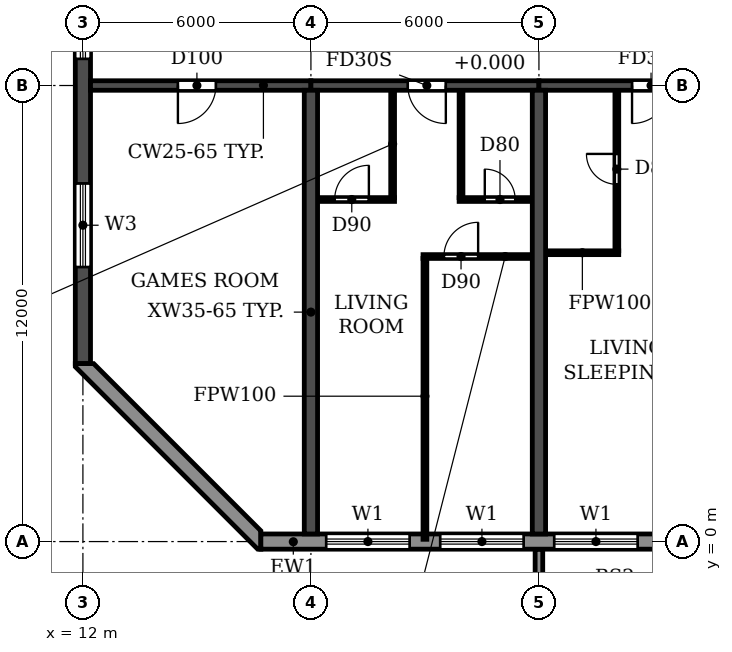
"""IFC4 building model, lengths in metres.
Left out: names, types, materials, properties, quantities, classifications, styles, units other than length and angle.
Written with IfcOpenShell. Run it as: python <this file> out.ifc"""

import sys

from ifc_helpers import new_model, si_unit, direction, frame, frame_2d, origin, place, context, subcontext, project, spatial, polyline, rectangle, outline, extrude, source, transform, mapped, element, fill, save


model = new_model("IFC4")
c1 = context("Model", 3, precision=1e-05, world=origin(), true_north=direction((0.0, 1.0)))
c2 = subcontext(c1, "Body", "Model", "MODEL_VIEW")
j1 = project(units=[si_unit("LENGTHUNIT", "METRE"), si_unit("PLANEANGLEUNIT", "RADIAN")], contexts=[c1])
p1 = place(None, origin())
s1 = spatial("IfcSite", under=j1, at=p1, CompositionType="ELEMENT")
p2 = place(p1, origin())
s2 = spatial("IfcBuilding", under=s1, at=p2, CompositionType="ELEMENT")
p3 = place(p2, frame((0.0, 0.0, 112.5)))
s3 = spatial("IfcBuildingStorey", under=s2, at=p3, CompositionType="ELEMENT", Elevation=112.5)
for number, where, z_axis, x_axis in (
    (1, (18.0, 0.2, 0.0), (0.0, 0.0, 1.0), (0.0, 1.0, 0.0)),
    (2, (24.0, 0.2, 0.0), (0.0, 0.0, 1.0), (0.0, 1.0, 0.0)),
):
    element("IfcWall", number, at=place(p3, frame(where, z_axis=z_axis, x_axis=x_axis)), inside=s3, PredefinedType="SHEAR", context=c2, shape_type="SweptSolid", body=[
        extrude(rectangle(XDim=11.675, YDim=0.35, at=frame_2d((5.837, 0.0))), origin(), (0.0, 0.0, 1.0), 2.95),
    ])
p4 = place(p3, frame((12.0, 4.683, 0.0), z_axis=(0.0, 0.0, 1.0), x_axis=(0.0, 1.0, 0.0)))
e3 = element("IfcWall", 3, at=p4, inside=s3, PredefinedType="SHEAR", context=c2, shape_type="SweptSolid", body=[
    extrude(rectangle(XDim=34.234, YDim=0.4, at=frame_2d((17.117, 0.0))), origin(), (0.0, 0.0, 1.0), 2.95),
])
p5 = place(p4, frame((23.817, 0.0, 0.9)))
e4 = element("IfcOpeningElement", 4, at=p5, cuts=e3, PredefinedType="OPENING", context=c2, shape_type="SweptSolid", body=[
    extrude(rectangle(XDim=1.2, YDim=1.5, at=frame_2d((0.6, 0.75))), frame((0.0, 0.21, 0.0), z_axis=(0.0, -1.0, 0.0), x_axis=(1.0, 0.0, 0.0)), (0.0, 0.0, 1.0), 0.42),
])
p6 = place(p4, frame((8.017, 0.0, 0.9)))
e5 = element("IfcOpeningElement", 5, at=p6, cuts=e3, PredefinedType="OPENING", context=c2, shape_type="SweptSolid", body=[
    extrude(rectangle(XDim=1.2, YDim=1.5, at=frame_2d((0.6, 0.75))), frame((0.0, 0.21, 0.0), z_axis=(0.0, -1.0, 0.0), x_axis=(1.0, 0.0, 0.0)), (0.0, 0.0, 1.0), 0.42),
])
p7 = place(p4, frame((15.917, 0.0, 0.9)))
e6 = element("IfcOpeningElement", 6, at=p7, cuts=e3, PredefinedType="OPENING", context=c2, shape_type="SweptSolid", body=[
    extrude(rectangle(XDim=1.2, YDim=1.5, at=frame_2d((0.6, 0.75))), frame((0.0, 0.21, 0.0), z_axis=(0.0, -1.0, 0.0), x_axis=(1.0, 0.0, 0.0)), (0.0, 0.0, 1.0), 0.42),
])
p8 = place(p4, frame((28.894, 0.0, 0.6)))
e7 = element("IfcOpeningElement", 7, at=p8, cuts=e3, PredefinedType="OPENING", context=c2, shape_type="SweptSolid", body=[
    extrude(rectangle(XDim=2.2, YDim=1.8, at=frame_2d((1.1, 0.9))), frame((0.0, 0.21, 0.0), z_axis=(0.0, -1.0, 0.0), x_axis=(1.0, 0.0, 0.0)), (0.0, 0.0, 1.0), 0.42),
])
p9 = place(p4, frame((2.541, 0.0, 0.6)))
e8 = element("IfcOpeningElement", 8, at=p9, cuts=e3, PredefinedType="OPENING", context=c2, shape_type="SweptSolid", body=[
    extrude(rectangle(XDim=2.2, YDim=1.8, at=frame_2d((1.1, 0.9))), frame((0.0, 0.21, 0.0), z_axis=(0.0, -1.0, 0.0), x_axis=(1.0, 0.0, 0.0)), (0.0, 0.0, 1.0), 0.42),
])
p10 = place(p3, frame((12.2, 12.0, 0.0), z_axis=(0.0, 0.0, 1.0), x_axis=(1.0, 0.0, 0.0)))
e9 = element("IfcWall", 9, at=p10, inside=s3, PredefinedType="SHEAR", context=c2, shape_type="SweptSolid", body=[
    extrude(rectangle(XDim=5.8, YDim=0.25, at=frame_2d((2.9, 0.0))), origin(), (0.0, 0.0, 1.0), 2.35),
])
p11 = place(p10, frame((2.3, 0.0, 0.0)))
e10 = element("IfcOpeningElement", 10, at=p11, cuts=e9, PredefinedType="OPENING", context=c2, shape_type="SweptSolid", body=[
    extrude(rectangle(XDim=1.0, YDim=2.1, at=frame_2d((0.5, 1.05))), frame((0.0, 0.135, 0.0), z_axis=(0.0, -1.0, 0.0), x_axis=(1.0, 0.0, 0.0)), (0.0, 0.0, 1.0), 0.27),
])
p12 = place(p3, frame((18.0, 12.0, 0.0), z_axis=(0.0, 0.0, 1.0), x_axis=(1.0, 0.0, 0.0)))
e11 = element("IfcWall", 11, at=p12, inside=s3, PredefinedType="SHEAR", context=c2, shape_type="SweptSolid", body=[
    extrude(rectangle(XDim=6.0, YDim=0.25, at=frame_2d((3.0, 0.0))), origin(), (0.0, 0.0, 1.0), 2.35),
])
p13 = place(p12, frame((2.55, 0.0, 0.0)))
e12 = element("IfcOpeningElement", 12, at=p13, cuts=e11, PredefinedType="OPENING", context=c2, shape_type="SweptSolid", body=[
    extrude(rectangle(XDim=1.0, YDim=2.1, at=frame_2d((0.5, 1.05))), frame((0.0, 0.135, 0.0), z_axis=(0.0, -1.0, 0.0), x_axis=(1.0, 0.0, 0.0)), (0.0, 0.0, 1.0), 0.27),
])
p14 = place(p3, frame((24.0, 12.0, 0.0), z_axis=(0.0, 0.0, 1.0), x_axis=(1.0, 0.0, 0.0)))
e13 = element("IfcWall", 13, at=p14, inside=s3, PredefinedType="SHEAR", context=c2, shape_type="SweptSolid", body=[
    extrude(rectangle(XDim=6.0, YDim=0.25, at=frame_2d((3.0, 0.0))), origin(), (0.0, 0.0, 1.0), 2.35),
])
p15 = place(p14, frame((2.45, 0.0, 0.0)))
e14 = element("IfcOpeningElement", 14, at=p15, cuts=e13, PredefinedType="OPENING", context=c2, shape_type="SweptSolid", body=[
    extrude(rectangle(XDim=1.0, YDim=2.1, at=frame_2d((0.5, 1.05))), frame((0.0, 0.135, 0.0), z_axis=(0.0, -1.0, 0.0), x_axis=(1.0, 0.0, 0.0)), (0.0, 0.0, 1.0), 0.27),
])
p16 = place(p3, frame((16.683, 0.0, 0.0), z_axis=(0.0, 0.0, 1.0), x_axis=(1.0, 0.0, 0.0)))
e15 = element("IfcWall", 15, at=p16, inside=s3, PredefinedType="STANDARD", context=c2, shape_type="SweptSolid", body=[
    extrude(rectangle(XDim=68.634, YDim=0.4, at=frame_2d((34.317, 0.0))), origin(), (0.0, 0.0, 1.0), 2.95),
])
p17 = place(p16, frame((1.717, 0.0, 0.9)))
e16 = element("IfcOpeningElement", 16, at=p17, cuts=e15, PredefinedType="OPENING", context=c2, shape_type="SweptSolid", body=[
    extrude(rectangle(XDim=2.2, YDim=1.5, at=frame_2d((1.1, 0.75))), frame((0.0, 0.21, 0.0), z_axis=(0.0, -1.0, 0.0), x_axis=(1.0, 0.0, 0.0)), (0.0, 0.0, 1.0), 0.42),
])
p18 = place(p16, frame((4.717, 0.0, 0.9)))
e17 = element("IfcOpeningElement", 17, at=p18, cuts=e15, PredefinedType="OPENING", context=c2, shape_type="SweptSolid", body=[
    extrude(rectangle(XDim=2.2, YDim=1.5, at=frame_2d((1.1, 0.75))), frame((0.0, 0.21, 0.0), z_axis=(0.0, -1.0, 0.0), x_axis=(1.0, 0.0, 0.0)), (0.0, 0.0, 1.0), 0.42),
])
p19 = place(p16, frame((7.717, 0.0, 0.9)))
e18 = element("IfcOpeningElement", 18, at=p19, cuts=e15, PredefinedType="OPENING", context=c2, shape_type="SweptSolid", body=[
    extrude(rectangle(XDim=2.2, YDim=1.5, at=frame_2d((1.1, 0.75))), frame((0.0, 0.21, 0.0), z_axis=(0.0, -1.0, 0.0), x_axis=(1.0, 0.0, 0.0)), (0.0, 0.0, 1.0), 0.42),
])
p20 = place(p16, frame((10.917, 0.0, 0.0)))
e19 = element("IfcOpeningElement", 19, at=p20, cuts=e15, PredefinedType="OPENING", context=c2, shape_type="SweptSolid", body=[
    extrude(rectangle(XDim=1.8, YDim=2.4, at=frame_2d((0.9, 1.2))), frame((0.0, 0.21, 0.0), z_axis=(0.0, -1.0, 0.0), x_axis=(1.0, 0.0, 0.0)), (0.0, 0.0, 1.0), 0.42),
])
p21 = place(p16, frame((13.717, 0.0, 0.9)))
e20 = element("IfcOpeningElement", 20, at=p21, cuts=e15, PredefinedType="OPENING", context=c2, shape_type="SweptSolid", body=[
    extrude(rectangle(XDim=2.2, YDim=1.5, at=frame_2d((1.1, 0.75))), frame((0.0, 0.21, 0.0), z_axis=(0.0, -1.0, 0.0), x_axis=(1.0, 0.0, 0.0)), (0.0, 0.0, 1.0), 0.42),
])
p22 = place(p16, frame((16.717, 0.0, 0.9)))
e21 = element("IfcOpeningElement", 21, at=p22, cuts=e15, PredefinedType="OPENING", context=c2, shape_type="SweptSolid", body=[
    extrude(rectangle(XDim=2.2, YDim=1.5, at=frame_2d((1.1, 0.75))), frame((0.0, 0.21, 0.0), z_axis=(0.0, -1.0, 0.0), x_axis=(1.0, 0.0, 0.0)), (0.0, 0.0, 1.0), 0.42),
])
p23 = place(p16, frame((19.717, 0.0, 0.9)))
e22 = element("IfcOpeningElement", 22, at=p23, cuts=e15, PredefinedType="OPENING", context=c2, shape_type="SweptSolid", body=[
    extrude(rectangle(XDim=2.2, YDim=1.5, at=frame_2d((1.1, 0.75))), frame((0.0, 0.21, 0.0), z_axis=(0.0, -1.0, 0.0), x_axis=(1.0, 0.0, 0.0)), (0.0, 0.0, 1.0), 0.42),
])
p24 = place(p16, frame((22.717, 0.0, 0.9)))
e23 = element("IfcOpeningElement", 23, at=p24, cuts=e15, PredefinedType="OPENING", context=c2, shape_type="SweptSolid", body=[
    extrude(rectangle(XDim=2.2, YDim=1.5, at=frame_2d((1.1, 0.75))), frame((0.0, 0.21, 0.0), z_axis=(0.0, -1.0, 0.0), x_axis=(1.0, 0.0, 0.0)), (0.0, 0.0, 1.0), 0.42),
])
p25 = place(p16, frame((25.717, 0.0, 0.9)))
e24 = element("IfcOpeningElement", 24, at=p25, cuts=e15, PredefinedType="OPENING", context=c2, shape_type="SweptSolid", body=[
    extrude(rectangle(XDim=2.2, YDim=1.5, at=frame_2d((1.1, 0.75))), frame((0.0, 0.21, 0.0), z_axis=(0.0, -1.0, 0.0), x_axis=(1.0, 0.0, 0.0)), (0.0, 0.0, 1.0), 0.42),
])
p26 = place(p16, frame((28.717, 0.0, 0.9)))
e25 = element("IfcOpeningElement", 25, at=p26, cuts=e15, PredefinedType="OPENING", context=c2, shape_type="SweptSolid", body=[
    extrude(rectangle(XDim=2.2, YDim=1.5, at=frame_2d((1.1, 0.75))), frame((0.0, 0.21, 0.0), z_axis=(0.0, -1.0, 0.0), x_axis=(1.0, 0.0, 0.0)), (0.0, 0.0, 1.0), 0.42),
])
p27 = place(p16, frame((31.917, 0.0, 0.0)))
e26 = element("IfcOpeningElement", 26, at=p27, cuts=e15, PredefinedType="OPENING", context=c2, shape_type="SweptSolid", body=[
    extrude(rectangle(XDim=1.8, YDim=2.4, at=frame_2d((0.9, 1.2))), frame((0.0, 0.21, 0.0), z_axis=(0.0, -1.0, 0.0), x_axis=(1.0, 0.0, 0.0)), (0.0, 0.0, 1.0), 0.42),
])
p28 = place(p16, frame((34.717, 0.0, 0.9)))
e27 = element("IfcOpeningElement", 27, at=p28, cuts=e15, PredefinedType="OPENING", context=c2, shape_type="SweptSolid", body=[
    extrude(rectangle(XDim=2.2, YDim=1.5, at=frame_2d((1.1, 0.75))), frame((0.0, 0.21, 0.0), z_axis=(0.0, -1.0, 0.0), x_axis=(1.0, 0.0, 0.0)), (0.0, 0.0, 1.0), 0.42),
])
p29 = place(p16, frame((37.717, 0.0, 0.9)))
e28 = element("IfcOpeningElement", 28, at=p29, cuts=e15, PredefinedType="OPENING", context=c2, shape_type="SweptSolid", body=[
    extrude(rectangle(XDim=2.2, YDim=1.5, at=frame_2d((1.1, 0.75))), frame((0.0, 0.21, 0.0), z_axis=(0.0, -1.0, 0.0), x_axis=(1.0, 0.0, 0.0)), (0.0, 0.0, 1.0), 0.42),
])
p30 = place(p16, frame((40.717, 0.0, 0.9)))
e29 = element("IfcOpeningElement", 29, at=p30, cuts=e15, PredefinedType="OPENING", context=c2, shape_type="SweptSolid", body=[
    extrude(rectangle(XDim=2.2, YDim=1.5, at=frame_2d((1.1, 0.75))), frame((0.0, 0.21, 0.0), z_axis=(0.0, -1.0, 0.0), x_axis=(1.0, 0.0, 0.0)), (0.0, 0.0, 1.0), 0.42),
])
p31 = place(p16, frame((43.717, 0.0, 0.9)))
e30 = element("IfcOpeningElement", 30, at=p31, cuts=e15, PredefinedType="OPENING", context=c2, shape_type="SweptSolid", body=[
    extrude(rectangle(XDim=2.2, YDim=1.5, at=frame_2d((1.1, 0.75))), frame((0.0, 0.21, 0.0), z_axis=(0.0, -1.0, 0.0), x_axis=(1.0, 0.0, 0.0)), (0.0, 0.0, 1.0), 0.42),
])
p32 = place(p16, frame((46.917, 0.0, 0.0)))
e31 = element("IfcOpeningElement", 31, at=p32, cuts=e15, PredefinedType="OPENING", context=c2, shape_type="SweptSolid", body=[
    extrude(rectangle(XDim=1.8, YDim=2.4, at=frame_2d((0.9, 1.2))), frame((0.0, 0.21, 0.0), z_axis=(0.0, -1.0, 0.0), x_axis=(1.0, 0.0, 0.0)), (0.0, 0.0, 1.0), 0.42),
])
p33 = place(p16, frame((49.717, 0.0, 0.9)))
e32 = element("IfcOpeningElement", 32, at=p33, cuts=e15, PredefinedType="OPENING", context=c2, shape_type="SweptSolid", body=[
    extrude(rectangle(XDim=2.2, YDim=1.5, at=frame_2d((1.1, 0.75))), frame((0.0, 0.21, 0.0), z_axis=(0.0, -1.0, 0.0), x_axis=(1.0, 0.0, 0.0)), (0.0, 0.0, 1.0), 0.42),
])
p34 = place(p16, frame((52.717, 0.0, 0.9)))
e33 = element("IfcOpeningElement", 33, at=p34, cuts=e15, PredefinedType="OPENING", context=c2, shape_type="SweptSolid", body=[
    extrude(rectangle(XDim=2.2, YDim=1.5, at=frame_2d((1.1, 0.75))), frame((0.0, 0.21, 0.0), z_axis=(0.0, -1.0, 0.0), x_axis=(1.0, 0.0, 0.0)), (0.0, 0.0, 1.0), 0.42),
])
p35 = place(p16, frame((55.717, 0.0, 0.9)))
e34 = element("IfcOpeningElement", 34, at=p35, cuts=e15, PredefinedType="OPENING", context=c2, shape_type="SweptSolid", body=[
    extrude(rectangle(XDim=2.2, YDim=1.5, at=frame_2d((1.1, 0.75))), frame((0.0, 0.21, 0.0), z_axis=(0.0, -1.0, 0.0), x_axis=(1.0, 0.0, 0.0)), (0.0, 0.0, 1.0), 0.42),
])
p36 = place(p16, frame((58.717, 0.0, 0.9)))
e35 = element("IfcOpeningElement", 35, at=p36, cuts=e15, PredefinedType="OPENING", context=c2, shape_type="SweptSolid", body=[
    extrude(rectangle(XDim=2.2, YDim=1.5, at=frame_2d((1.1, 0.75))), frame((0.0, 0.21, 0.0), z_axis=(0.0, -1.0, 0.0), x_axis=(1.0, 0.0, 0.0)), (0.0, 0.0, 1.0), 0.42),
])
p37 = place(p16, frame((61.717, 0.0, 0.9)))
e36 = element("IfcOpeningElement", 36, at=p37, cuts=e15, PredefinedType="OPENING", context=c2, shape_type="SweptSolid", body=[
    extrude(rectangle(XDim=2.2, YDim=1.5, at=frame_2d((1.1, 0.75))), frame((0.0, 0.21, 0.0), z_axis=(0.0, -1.0, 0.0), x_axis=(1.0, 0.0, 0.0)), (0.0, 0.0, 1.0), 0.42),
])
p38 = place(p16, frame((64.717, 0.0, 0.9)))
e37 = element("IfcOpeningElement", 37, at=p38, cuts=e15, PredefinedType="OPENING", context=c2, shape_type="SweptSolid", body=[
    extrude(rectangle(XDim=2.2, YDim=1.5, at=frame_2d((1.1, 0.75))), frame((0.0, 0.21, 0.0), z_axis=(0.0, -1.0, 0.0), x_axis=(1.0, 0.0, 0.0)), (0.0, 0.0, 1.0), 0.42),
])
p39 = place(p3, origin())
e38 = element("IfcWall", 38, at=p39, inside=s3, PredefinedType="STANDARD", context=c2, shape_type="SweptSolid", body=[
    extrude(outline(polyline([(11.8, 4.683), (11.8, 4.6), (16.6, -0.2), (16.683, -0.2), (16.683, 0.283), (12.283, 4.683), (11.8, 4.683)])), origin(), (0.0, 0.0, 1.0), 2.95),
])
m1 = source(origin(), c2, "Body", "SweptSolid", [
    extrude(outline(polyline([(0.0, 0.0), (0.2, 0.0), (0.2, 1.65), (0.0, 1.65), (0.0, 0.0)])), origin(), (0.0, 0.0, 1.0), 3.1),
])
p40 = place(p3, frame((23.9, -1.85, 0.0)))
e39 = element("IfcWall", 39, at=p40, inside=s3, PredefinedType="STANDARD", context=c2, shape_type="MappedRepresentation", body=[
    mapped(m1, transform((0.0, 0.0, 0.0))),
])
p41 = place(p3, frame((20.95, 7.5, 0.0), z_axis=(0.0, 0.0, 1.0), x_axis=(1.0, 0.0, 0.0)))
e40 = element("IfcWall", 40, at=p41, inside=s3, PredefinedType="PARTITIONING", context=c2, shape_type="SweptSolid", body=[
    extrude(rectangle(XDim=2.865, YDim=0.1, at=frame_2d((1.433, 0.0))), origin(), (0.0, 0.0, 1.0), 2.95),
])
p42 = place(p41, frame((0.55, 0.0, 0.0)))
e41 = element("IfcOpeningElement", 41, at=p42, cuts=e40, PredefinedType="OPENING", context=c2, shape_type="SweptSolid", body=[
    extrude(rectangle(XDim=0.9, YDim=2.1, at=frame_2d((0.45, 1.05))), frame((0.0, 0.06, 0.0), z_axis=(0.0, -1.0, 0.0), x_axis=(1.0, 0.0, 0.0)), (0.0, 0.0, 1.0), 0.12),
])
p43 = place(p3, frame((24.185, 7.6, 0.0), z_axis=(0.0, 0.0, 1.0), x_axis=(1.0, 0.0, 0.0)))
e42 = element("IfcWall", 42, at=p43, inside=s3, PredefinedType="PARTITIONING", context=c2, shape_type="SweptSolid", body=[
    extrude(rectangle(XDim=1.915, YDim=0.1, at=frame_2d((0.958, 0.0))), origin(), (0.0, 0.0, 1.0), 2.95),
])
p44 = place(p3, frame((18.185, 9.0, 0.0), z_axis=(0.0, 0.0, 1.0), x_axis=(1.0, 0.0, 0.0)))
e43 = element("IfcWall", 43, at=p44, inside=s3, PredefinedType="PARTITIONING", context=c2, shape_type="SweptSolid", body=[
    extrude(rectangle(XDim=2.015, YDim=0.1, at=frame_2d((1.007, 0.0))), origin(), (0.0, 0.0, 1.0), 2.95),
])
p45 = place(p44, frame((0.44, 0.0, 0.0)))
e44 = element("IfcOpeningElement", 44, at=p45, cuts=e43, PredefinedType="OPENING", context=c2, shape_type="SweptSolid", body=[
    extrude(rectangle(XDim=0.9, YDim=2.1, at=frame_2d((0.45, 1.05))), frame((0.0, 0.06, 0.0), z_axis=(0.0, -1.0, 0.0), x_axis=(1.0, 0.0, 0.0)), (0.0, 0.0, 1.0), 0.12),
])
p46 = place(p3, frame((21.9, 9.0, 0.0), z_axis=(0.0, 0.0, 1.0), x_axis=(1.0, 0.0, 0.0)))
e45 = element("IfcWall", 45, at=p46, inside=s3, PredefinedType="PARTITIONING", context=c2, shape_type="SweptSolid", body=[
    extrude(rectangle(XDim=1.915, YDim=0.1, at=frame_2d((0.958, 0.0))), origin(), (0.0, 0.0, 1.0), 2.95),
])
p47 = place(p46, frame((0.675, 0.0, 0.0)))
e46 = element("IfcOpeningElement", 46, at=p47, cuts=e45, PredefinedType="OPENING", context=c2, shape_type="SweptSolid", body=[
    extrude(rectangle(XDim=0.8, YDim=2.1, at=frame_2d((0.4, 1.05))), frame((0.0, 0.06, 0.0), z_axis=(0.0, -1.0, 0.0), x_axis=(1.0, 0.0, 0.0)), (0.0, 0.0, 1.0), 0.12),
])
p48 = place(p3, frame((20.15, 9.05, 0.0), z_axis=(0.0, 0.0, 1.0), x_axis=(0.0, 1.0, 0.0)))
e47 = element("IfcWall", 47, at=p48, inside=s3, PredefinedType="PARTITIONING", context=c2, shape_type="SweptSolid", body=[
    extrude(rectangle(XDim=2.815, YDim=0.1, at=frame_2d((1.407, 0.0))), origin(), (0.0, 0.0, 1.0), 2.95),
])
p49 = place(p3, frame((21.0, 0.06, 0.0), z_axis=(0.0, 0.0, 1.0), x_axis=(0.0, 1.0, 0.0)))
e48 = element("IfcWall", 48, at=p49, inside=s3, PredefinedType="PARTITIONING", context=c2, shape_type="SweptSolid", body=[
    extrude(rectangle(XDim=7.39, YDim=0.1, at=frame_2d((3.695, 0.0))), origin(), (0.0, 0.0, 1.0), 2.95),
])
p50 = place(p3, frame((21.95, 9.05, 0.0), z_axis=(0.0, 0.0, 1.0), x_axis=(0.0, 1.0, 0.0)))
e49 = element("IfcWall", 49, at=p50, inside=s3, PredefinedType="PARTITIONING", context=c2, shape_type="SweptSolid", body=[
    extrude(rectangle(XDim=2.815, YDim=0.1, at=frame_2d((1.407, 0.0))), origin(), (0.0, 0.0, 1.0), 2.95),
])
p51 = place(p3, frame((26.05, 7.65, 0.0), z_axis=(0.0, 0.0, 1.0), x_axis=(0.0, 1.0, 0.0)))
e50 = element("IfcWall", 50, at=p51, inside=s3, PredefinedType="PARTITIONING", context=c2, shape_type="SweptSolid", body=[
    extrude(rectangle(XDim=4.215, YDim=0.1, at=frame_2d((2.107, 0.0))), origin(), (0.0, 0.0, 1.0), 2.95),
])
p52 = place(p51, frame((1.75, 0.0, 0.0)))
e51 = element("IfcOpeningElement", 51, at=p52, cuts=e50, PredefinedType="OPENING", context=c2, shape_type="SweptSolid", body=[
    extrude(rectangle(XDim=0.8, YDim=2.1, at=frame_2d((0.4, 1.05))), frame((0.0, 0.06, 0.0), z_axis=(0.0, -1.0, 0.0), x_axis=(1.0, 0.0, 0.0)), (0.0, 0.0, 1.0), 0.12),
])
p53 = place(p17, origin())
e52 = element("IfcWindow", 52, at=p53, inside=s3, PartitioningType="DOUBLE_PANEL_HORIZONTAL", PredefinedType="WINDOW", context=c2, shape_type="SweptSolid", body=[
    extrude(rectangle(XDim=2.2, YDim=1.5, at=frame_2d((1.1, 0.75))), frame((0.0, 0.03, 0.0), z_axis=(0.0, -1.0, 0.0), x_axis=(1.0, 0.0, 0.0)), (0.0, 0.0, 1.0), 0.06),
])
fill(e16, e52)
p54 = place(p18, origin())
e53 = element("IfcWindow", 53, at=p54, inside=s3, PartitioningType="DOUBLE_PANEL_HORIZONTAL", PredefinedType="WINDOW", context=c2, shape_type="SweptSolid", body=[
    extrude(rectangle(XDim=2.2, YDim=1.5, at=frame_2d((1.1, 0.75))), frame((0.0, 0.03, 0.0), z_axis=(0.0, -1.0, 0.0), x_axis=(1.0, 0.0, 0.0)), (0.0, 0.0, 1.0), 0.06),
])
fill(e17, e53)
p55 = place(p19, origin())
e54 = element("IfcWindow", 54, at=p55, inside=s3, PartitioningType="DOUBLE_PANEL_HORIZONTAL", PredefinedType="WINDOW", context=c2, shape_type="SweptSolid", body=[
    extrude(rectangle(XDim=2.2, YDim=1.5, at=frame_2d((1.1, 0.75))), frame((0.0, 0.03, 0.0), z_axis=(0.0, -1.0, 0.0), x_axis=(1.0, 0.0, 0.0)), (0.0, 0.0, 1.0), 0.06),
])
fill(e18, e54)
p56 = place(p6, origin())
e55 = element("IfcWindow", 55, at=p56, inside=s3, PartitioningType="SINGLE_PANEL", PredefinedType="WINDOW", context=c2, shape_type="SweptSolid", body=[
    extrude(rectangle(XDim=1.2, YDim=1.5, at=frame_2d((0.6, 0.75))), frame((0.0, 0.03, 0.0), z_axis=(0.0, -1.0, 0.0), x_axis=(1.0, 0.0, 0.0)), (0.0, 0.0, 1.0), 0.06),
])
fill(e5, e55)
p57 = place(p9, origin())
e56 = element("IfcWindow", 56, at=p57, inside=s3, PartitioningType="DOUBLE_PANEL_HORIZONTAL", PredefinedType="WINDOW", context=c2, shape_type="SweptSolid", body=[
    extrude(rectangle(XDim=2.2, YDim=1.8, at=frame_2d((1.1, 0.9))), frame((0.0, 0.03, 0.0), z_axis=(0.0, -1.0, 0.0), x_axis=(1.0, 0.0, 0.0)), (0.0, 0.0, 1.0), 0.06),
])
fill(e8, e56)
p58 = place(p11, frame((1.0, 0.0, 0.0), z_axis=(0.0, 0.0, 1.0), x_axis=(-1.0, 0.0, 0.0)))
e57 = element("IfcDoor", 57, at=p58, inside=s3, OperationType="SINGLE_SWING_RIGHT", PredefinedType="DOOR", context=c2, shape_type="SweptSolid", body=[
    extrude(rectangle(XDim=1.0, YDim=2.1, at=frame_2d((0.5, 1.05))), frame((0.0, 0.025, 0.0), z_axis=(0.0, -1.0, 0.0), x_axis=(1.0, 0.0, 0.0)), (0.0, 0.0, 1.0), 0.05),
])
fill(e10, e57)
p59 = place(p45, origin())
e58 = element("IfcDoor", 58, at=p59, inside=s3, OperationType="SINGLE_SWING_RIGHT", PredefinedType="DOOR", context=c2, shape_type="SweptSolid", body=[
    extrude(rectangle(XDim=0.9, YDim=2.1, at=frame_2d((0.45, 1.05))), frame((0.0, 0.025, 0.0), z_axis=(0.0, -1.0, 0.0), x_axis=(1.0, 0.0, 0.0)), (0.0, 0.0, 1.0), 0.05),
])
fill(e44, e58)
p60 = place(p13, frame((1.0, 0.0, 0.0), z_axis=(0.0, 0.0, 1.0), x_axis=(-1.0, 0.0, 0.0)))
e59 = element("IfcDoor", 59, at=p60, inside=s3, OperationType="SINGLE_SWING_LEFT", PredefinedType="DOOR", context=c2, shape_type="SweptSolid", body=[
    extrude(rectangle(XDim=1.0, YDim=2.1, at=frame_2d((0.5, 1.05))), frame((0.0, 0.025, 0.0), z_axis=(0.0, -1.0, 0.0), x_axis=(1.0, 0.0, 0.0)), (0.0, 0.0, 1.0), 0.05),
])
fill(e12, e59)
p61 = place(p42, origin())
e60 = element("IfcDoor", 60, at=p61, inside=s3, OperationType="SINGLE_SWING_RIGHT", PredefinedType="DOOR", context=c2, shape_type="SweptSolid", body=[
    extrude(rectangle(XDim=0.9, YDim=2.1, at=frame_2d((0.45, 1.05))), frame((0.0, 0.025, 0.0), z_axis=(0.0, -1.0, 0.0), x_axis=(1.0, 0.0, 0.0)), (0.0, 0.0, 1.0), 0.05),
])
fill(e41, e60)
p62 = place(p47, origin())
e61 = element("IfcDoor", 61, at=p62, inside=s3, OperationType="SINGLE_SWING_LEFT", PredefinedType="DOOR", context=c2, shape_type="SweptSolid", body=[
    extrude(rectangle(XDim=0.8, YDim=2.1, at=frame_2d((0.4, 1.05))), frame((0.0, 0.025, 0.0), z_axis=(0.0, -1.0, 0.0), x_axis=(1.0, 0.0, 0.0)), (0.0, 0.0, 1.0), 0.05),
])
fill(e46, e61)
p63 = place(p52, origin())
e62 = element("IfcDoor", 62, at=p63, inside=s3, OperationType="SINGLE_SWING_RIGHT", PredefinedType="DOOR", context=c2, shape_type="SweptSolid", body=[
    extrude(rectangle(XDim=0.8, YDim=2.1, at=frame_2d((0.4, 1.05))), frame((0.0, 0.025, 0.0), z_axis=(0.0, -1.0, 0.0), x_axis=(1.0, 0.0, 0.0)), (0.0, 0.0, 1.0), 0.05),
])
fill(e51, e62)
p64 = place(p15, frame((1.0, 0.0, 0.0), z_axis=(0.0, 0.0, 1.0), x_axis=(-1.0, 0.0, 0.0)))
e63 = element("IfcDoor", 63, at=p64, inside=s3, OperationType="SINGLE_SWING_RIGHT", PredefinedType="DOOR", context=c2, shape_type="SweptSolid", body=[
    extrude(rectangle(XDim=1.0, YDim=2.1, at=frame_2d((0.5, 1.05))), frame((0.0, 0.025, 0.0), z_axis=(0.0, -1.0, 0.0), x_axis=(1.0, 0.0, 0.0)), (0.0, 0.0, 1.0), 0.05),
])
fill(e14, e63)
save(model, sys.argv[1])
